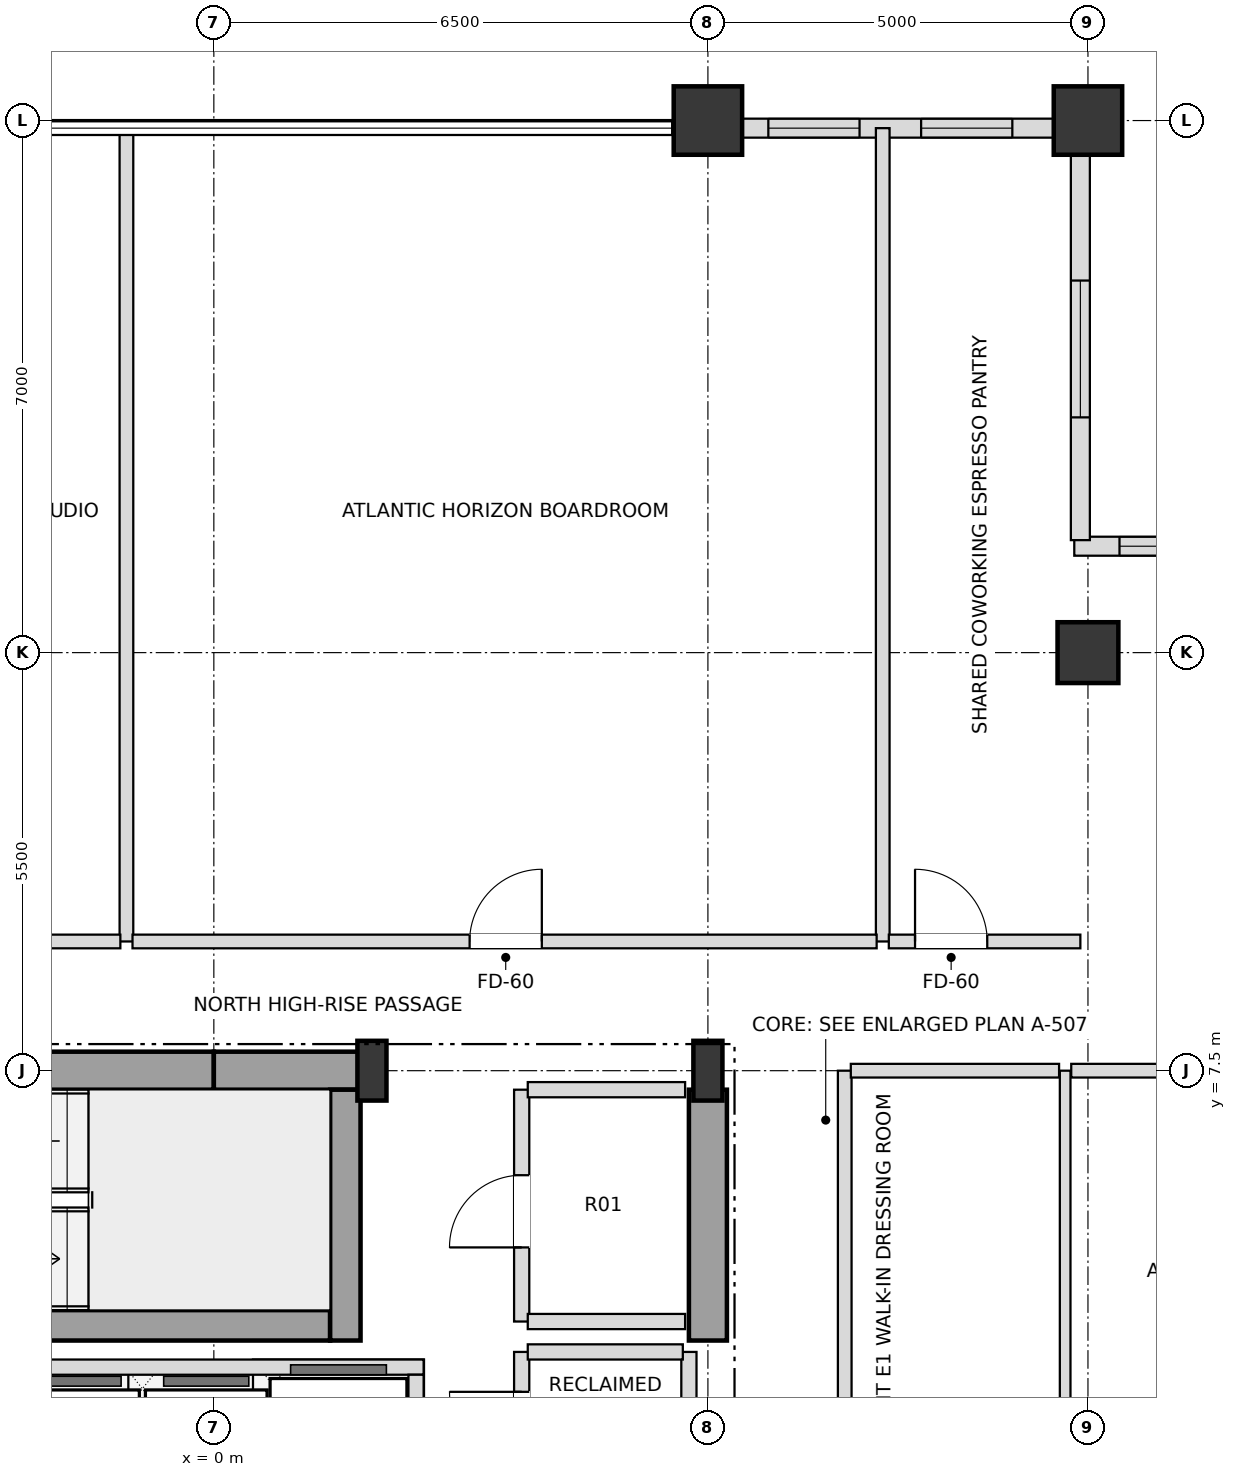
"""IFC4 building model, lengths in metres.
Left out: names, types, materials, properties, quantities, classifications, styles, units other than length and angle.
Written with IfcOpenShell. Run it as: python <this file> out.ifc"""

import sys

from ifc_helpers import new_model, si_unit, direction, frame, frame_2d, origin, origin_2d, place, context, subcontext, project, spatial, rectangle, i_section, extrude, element, fill, save


model = new_model("IFC4")
c1 = context("Model", 3, precision=1e-05, world=origin(), true_north=direction((0.0, 1.0)))
c2 = subcontext(c1, "Body", "Model", "MODEL_VIEW")
j1 = project(units=[si_unit("LENGTHUNIT", "METRE"), si_unit("PLANEANGLEUNIT", "RADIAN")], contexts=[c1])
p1 = place(None, origin())
s1 = spatial("IfcSite", under=j1, at=p1, CompositionType="ELEMENT")
p2 = place(p1, origin())
s2 = spatial("IfcBuilding", under=s1, at=p2, CompositionType="ELEMENT")
p3 = place(p2, frame((0.0, 0.0, 287.1)))
s3 = spatial("IfcBuildingStorey", under=s2, at=p3, CompositionType="ELEMENT", Elevation=287.1)
for number, where, z_axis, x_axis in (
    (1, (2.08, 7.5, 0.0), (0.0, 0.0, 1.0), (1.0, 0.0, 0.0)),
    (2, (6.5, 7.5, 0.0), (0.0, 0.0, 1.0), (1.0, 0.0, 0.0)),
):
    element("IfcColumn", number, at=place(p3, frame(where, z_axis=z_axis, x_axis=x_axis)), inside=s3, PredefinedType="COLUMN", context=c2, shape_type="SweptSolid", body=[
        extrude(i_section(OverallWidth=0.382, OverallDepth=0.786, WebThickness=0.02, FlangeThickness=0.033, at=origin_2d()), origin(), (0.0, 0.0, 1.0), 3.6),
    ])
for number, where, z_axis, x_axis in (
    (3, (11.5, 20.0, 0.0), (0.0, 0.0, 1.0), (1.0, 0.0, 0.0)),
    (4, (6.5, 20.0, 0.0), (0.0, 0.0, 1.0), (1.0, 0.0, 0.0)),
):
    element("IfcColumn", number, at=place(p3, frame(where, z_axis=z_axis, x_axis=x_axis)), inside=s3, PredefinedType="USERDEFINED", context=c2, shape_type="SweptSolid", body=[
        extrude(rectangle(XDim=0.9, YDim=0.9, at=origin_2d()), origin(), (0.0, 0.0, 1.0), 3.6),
    ])
p4 = place(p3, frame((11.5, 13.0, 0.0), z_axis=(0.0, 0.0, 1.0), x_axis=(1.0, 0.0, 0.0)))
e5 = element("IfcColumn", 5, at=p4, inside=s3, PredefinedType="COLUMN", context=c2, shape_type="SweptSolid", body=[
    extrude(rectangle(XDim=0.8, YDim=0.8, at=origin_2d()), origin(), (0.0, 0.0, 1.0), 3.6),
])
p5 = place(p3, frame((11.055, 19.9, 0.0), z_axis=(0.0, 0.0, 1.0), x_axis=(-1.0, 0.0, 0.0)))
e6 = element("IfcWall", 6, at=p5, inside=s3, PredefinedType="SOLIDWALL", context=c2, shape_type="SweptSolid", body=[
    extrude(rectangle(XDim=4.11, YDim=0.25, at=frame_2d((2.055, 0.0))), origin(), (0.0, 0.0, 1.0), 2.748),
])
p6 = place(p5, frame((0.55, 0.0, 0.72)))
e7 = element("IfcOpeningElement", 7, at=p6, cuts=e6, PredefinedType="OPENING", context=c2, shape_type="SweptSolid", body=[
    extrude(rectangle(XDim=1.2, YDim=1.68, at=frame_2d((0.6, 0.84))), frame((0.0, 0.135, 0.0), z_axis=(0.0, -1.0, 0.0), x_axis=(1.0, 0.0, 0.0)), (0.0, 0.0, 1.0), 0.27),
])
p7 = place(p5, frame((2.56, 0.0, 0.72)))
e8 = element("IfcOpeningElement", 8, at=p7, cuts=e6, PredefinedType="OPENING", context=c2, shape_type="SweptSolid", body=[
    extrude(rectangle(XDim=1.2, YDim=1.68, at=frame_2d((0.6, 0.84))), frame((0.0, 0.135, 0.0), z_axis=(0.0, -1.0, 0.0), x_axis=(1.0, 0.0, 0.0)), (0.0, 0.0, 1.0), 0.27),
])
p8 = place(p3, frame((16.98, 14.4, 0.0), z_axis=(0.0, 0.0, 1.0), x_axis=(-1.0, 0.0, 0.0)))
e9 = element("IfcWall", 9, at=p8, inside=s3, PredefinedType="SOLIDWALL", context=c2, shape_type="SweptSolid", body=[
    extrude(rectangle(XDim=5.66, YDim=0.25, at=frame_2d((2.83, 0.0))), origin(), (0.0, 0.0, 1.0), 2.748),
])
p9 = place(p8, frame((0.595, 0.0, 0.72)))
e10 = element("IfcOpeningElement", 10, at=p9, cuts=e9, PredefinedType="OPENING", context=c2, shape_type="SweptSolid", body=[
    extrude(rectangle(XDim=1.8, YDim=1.68, at=frame_2d((0.9, 0.84))), frame((0.0, 0.135, 0.0), z_axis=(0.0, -1.0, 0.0), x_axis=(1.0, 0.0, 0.0)), (0.0, 0.0, 1.0), 0.27),
])
p10 = place(p8, frame((3.265, 0.0, 0.72)))
e11 = element("IfcOpeningElement", 11, at=p10, cuts=e9, PredefinedType="OPENING", context=c2, shape_type="SweptSolid", body=[
    extrude(rectangle(XDim=1.8, YDim=1.68, at=frame_2d((0.9, 0.84))), frame((0.0, 0.135, 0.0), z_axis=(0.0, -1.0, 0.0), x_axis=(1.0, 0.0, 0.0)), (0.0, 0.0, 1.0), 0.27),
])
p11 = place(p3, frame((11.4, 14.48, 0.0), z_axis=(0.0, 0.0, 1.0), x_axis=(0.0, 1.0, 0.0)))
e12 = element("IfcWall", 12, at=p11, inside=s3, PredefinedType="SOLIDWALL", context=c2, shape_type="SweptSolid", body=[
    extrude(rectangle(XDim=5.34, YDim=0.25, at=frame_2d((2.67, 0.0))), origin(), (0.0, 0.0, 1.0), 2.748),
])
p12 = place(p11, frame((1.615, 0.0, 0.72)))
e13 = element("IfcOpeningElement", 13, at=p12, cuts=e12, PredefinedType="OPENING", context=c2, shape_type="SweptSolid", body=[
    extrude(rectangle(XDim=1.8, YDim=1.68, at=frame_2d((0.9, 0.84))), frame((0.0, 0.135, 0.0), z_axis=(0.0, -1.0, 0.0), x_axis=(1.0, 0.0, 0.0)), (0.0, 0.0, 1.0), 0.27),
])
p13 = place(p3, frame((-6.75, 7.5, 0.0), z_axis=(0.0, 0.0, 1.0), x_axis=(1.0, 0.0, 0.0)))
e14 = element("IfcWall", 14, at=p13, inside=s3, PredefinedType="SHEAR", context=c2, shape_type="SweptSolid", body=[
    extrude(rectangle(XDim=6.75, YDim=0.5, at=frame_2d((3.375, 0.0))), origin(), (0.0, 0.0, 1.0), 3.38),
])
p14 = place(p13, frame((1.65, 0.0, 0.0)))
e15 = element("IfcOpeningElement", 15, at=p14, cuts=e14, PredefinedType="OPENING", context=c2, shape_type="SweptSolid", body=[
    extrude(rectangle(XDim=1.05, YDim=2.15, at=frame_2d((0.525, 1.075))), frame((0.0, 0.26, 0.0), z_axis=(0.0, -1.0, 0.0), x_axis=(1.0, 0.0, 0.0)), (0.0, 0.0, 1.0), 0.52),
])
p15 = place(p3, frame((0.0, 7.5, 0.0), z_axis=(0.0, 0.0, 1.0), x_axis=(1.0, 0.0, 0.0)))
e16 = element("IfcWall", 16, at=p15, inside=s3, PredefinedType="SHEAR", context=c2, shape_type="SweptSolid", body=[
    extrude(rectangle(XDim=2.08, YDim=0.5, at=frame_2d((1.04, 0.0))), origin(), (0.0, 0.0, 1.0), 3.38),
])
p16 = place(p3, frame((6.5, 3.95, 0.0), z_axis=(0.0, 0.0, 1.0), x_axis=(0.0, 1.0, 0.0)))
e17 = element("IfcWall", 17, at=p16, inside=s3, PredefinedType="SHEAR", context=c2, shape_type="SweptSolid", body=[
    extrude(rectangle(XDim=3.3, YDim=0.5, at=frame_2d((1.65, 0.0))), origin(), (0.0, 0.0, 1.0), 3.38),
])
p17 = place(p3, frame((-5.55, 4.15, 0.0), z_axis=(0.0, 0.0, 1.0), x_axis=(1.0, 0.0, 0.0)))
e18 = element("IfcWall", 18, at=p17, inside=s3, PredefinedType="SHEAR", context=c2, shape_type="SweptSolid", body=[
    extrude(rectangle(XDim=7.08, YDim=0.4, at=frame_2d((3.54, 0.0))), origin(), (0.0, 0.0, 1.0), 3.38),
])
p18 = place(p3, frame((1.73, 3.95, 0.0), z_axis=(0.0, 0.0, 1.0), x_axis=(0.0, 1.0, 0.0)))
e19 = element("IfcWall", 19, at=p18, inside=s3, PredefinedType="SHEAR", context=c2, shape_type="SweptSolid", body=[
    extrude(rectangle(XDim=3.3, YDim=0.4, at=frame_2d((1.65, 0.0))), origin(), (0.0, 0.0, 1.0), 3.38),
])
p19 = place(p3, frame((-2.82, 3.6, 0.0), z_axis=(0.0, 0.0, 1.0), x_axis=(1.0, 0.0, 0.0)))
e20 = element("IfcWall", 20, at=p19, inside=s3, PredefinedType="SOLIDWALL", context=c2, shape_type="SweptSolid", body=[
    extrude(rectangle(XDim=5.58, YDim=0.2, at=frame_2d((2.79, 0.0))), origin(), (0.0, 0.0, 1.0), 3.38),
])
p20 = place(p3, frame((2.66, 1.0, 0.0), z_axis=(0.0, 0.0, 1.0), x_axis=(0.0, 1.0, 0.0)))
e21 = element("IfcWall", 21, at=p20, inside=s3, PredefinedType="SOLIDWALL", context=c2, shape_type="SweptSolid", body=[
    extrude(rectangle(XDim=2.5, YDim=0.2, at=frame_2d((1.25, 0.0))), origin(), (0.0, 0.0, 1.0), 3.38),
])
p21 = place(p3, frame((-1.15, 9.2, 0.0), z_axis=(0.0, 0.0, 1.0), x_axis=(0.0, 1.0, 0.0)))
e22 = element("IfcWall", 22, at=p21, inside=s3, PredefinedType="PARTITIONING", context=c2, shape_type="SweptSolid", body=[
    extrude(rectangle(XDim=10.7, YDim=0.18, at=frame_2d((5.35, 0.0))), origin(), (0.0, 0.0, 1.0), 3.018),
])
p22 = place(p3, frame((4.05, -1.35, 0.0), z_axis=(0.0, 0.0, 1.0), x_axis=(0.0, 1.0, 0.0)))
e23 = element("IfcWall", 23, at=p22, inside=s3, PredefinedType="SOLIDWALL", context=c2, shape_type="SweptSolid", body=[
    extrude(rectangle(XDim=5.15, YDim=0.2, at=frame_2d((2.575, 0.0))), origin(), (0.0, 0.0, 1.0), 3.38),
])
p23 = place(p22, frame((1.095, 0.0, 0.0)))
e24 = element("IfcOpeningElement", 24, at=p23, cuts=e23, PredefinedType="OPENING", context=c2, shape_type="SweptSolid", body=[
    extrude(rectangle(XDim=0.95, YDim=2.15, at=frame_2d((0.475, 1.075))), frame((0.0, 0.11, 0.0), z_axis=(0.0, -1.0, 0.0), x_axis=(1.0, 0.0, 0.0)), (0.0, 0.0, 1.0), 0.22),
])
p24 = place(p22, frame((3.675, 0.0, 0.0)))
e25 = element("IfcOpeningElement", 25, at=p24, cuts=e23, PredefinedType="OPENING", context=c2, shape_type="SweptSolid", body=[
    extrude(rectangle(XDim=0.95, YDim=2.15, at=frame_2d((0.475, 1.075))), frame((0.0, 0.11, 0.0), z_axis=(0.0, -1.0, 0.0), x_axis=(1.0, 0.0, 0.0)), (0.0, 0.0, 1.0), 0.22),
])
p25 = place(p3, frame((4.05, 4.2, 0.0), z_axis=(0.0, 0.0, 1.0), x_axis=(0.0, 1.0, 0.0)))
e26 = element("IfcWall", 26, at=p25, inside=s3, PredefinedType="SOLIDWALL", context=c2, shape_type="SweptSolid", body=[
    extrude(rectangle(XDim=3.05, YDim=0.2, at=frame_2d((1.525, 0.0))), origin(), (0.0, 0.0, 1.0), 3.38),
])
p26 = place(p25, frame((0.975, 0.0, 0.0)))
e27 = element("IfcOpeningElement", 27, at=p26, cuts=e26, PredefinedType="OPENING", context=c2, shape_type="SweptSolid", body=[
    extrude(rectangle(XDim=0.95, YDim=2.15, at=frame_2d((0.475, 1.075))), frame((0.0, 0.11, 0.0), z_axis=(0.0, -1.0, 0.0), x_axis=(1.0, 0.0, 0.0)), (0.0, 0.0, 1.0), 0.22),
])
p27 = place(p3, frame((6.25, -1.35, 0.0), z_axis=(0.0, 0.0, 1.0), x_axis=(0.0, 1.0, 0.0)))
e28 = element("IfcWall", 28, at=p27, inside=s3, PredefinedType="SOLIDWALL", context=c2, shape_type="SweptSolid", body=[
    extrude(rectangle(XDim=5.15, YDim=0.2, at=frame_2d((2.575, 0.0))), origin(), (0.0, 0.0, 1.0), 3.38),
])
p28 = place(p3, frame((8.3, -7.5, 0.0), z_axis=(0.0, 0.0, 1.0), x_axis=(0.0, 1.0, 0.0)))
e29 = element("IfcWall", 29, at=p28, inside=s3, PredefinedType="PARTITIONING", context=c2, shape_type="SweptSolid", body=[
    extrude(rectangle(XDim=15.0, YDim=0.18, at=frame_2d((7.5, 0.0))), origin(), (0.0, 0.0, 1.0), 3.38),
])
p29 = place(p28, frame((2.355, 0.0, 0.0)))
e30 = element("IfcOpeningElement", 30, at=p29, cuts=e29, PredefinedType="OPENING", context=c2, shape_type="SweptSolid", body=[
    extrude(rectangle(XDim=0.95, YDim=2.15, at=frame_2d((0.475, 1.075))), frame((0.0, 0.1, 0.0), z_axis=(0.0, -1.0, 0.0), x_axis=(1.0, 0.0, 0.0)), (0.0, 0.0, 1.0), 0.2),
])
p30 = place(p3, frame((8.8, 9.2, 0.0), z_axis=(0.0, 0.0, 1.0), x_axis=(0.0, 1.0, 0.0)))
e31 = element("IfcWall", 31, at=p30, inside=s3, PredefinedType="PARTITIONING", context=c2, shape_type="SweptSolid", body=[
    extrude(rectangle(XDim=10.7, YDim=0.18, at=frame_2d((5.35, 0.0))), origin(), (0.0, 0.0, 1.0), 2.826),
])
p31 = place(p3, frame((11.2, -7.5, 0.0), z_axis=(0.0, 0.0, 1.0), x_axis=(0.0, 1.0, 0.0)))
e32 = element("IfcWall", 32, at=p31, inside=s3, PredefinedType="PARTITIONING", context=c2, shape_type="SweptSolid", body=[
    extrude(rectangle(XDim=15.0, YDim=0.14, at=frame_2d((7.5, 0.0))), origin(), (0.0, 0.0, 1.0), 3.38),
])
p32 = place(p31, frame((3.475, 0.0, 0.0)))
e33 = element("IfcOpeningElement", 33, at=p32, cuts=e32, PredefinedType="OPENING", context=c2, shape_type="SweptSolid", body=[
    extrude(rectangle(XDim=0.95, YDim=2.1, at=frame_2d((0.475, 1.05))), frame((0.0, 0.08, 0.0), z_axis=(0.0, -1.0, 0.0), x_axis=(1.0, 0.0, 0.0)), (0.0, 0.0, 1.0), 0.16),
])
p33 = place(p3, frame((4.13, 3.8, 0.0), z_axis=(0.0, 0.0, 1.0), x_axis=(1.0, 0.0, 0.0)))
e34 = element("IfcWall", 34, at=p33, inside=s3, PredefinedType="SOLIDWALL", context=c2, shape_type="SweptSolid", body=[
    extrude(rectangle(XDim=2.04, YDim=0.2, at=frame_2d((1.02, 0.0))), origin(), (0.0, 0.0, 1.0), 3.38),
])
for number, where, z_axis, x_axis in (
    (35, (4.13, 4.2, 0.0), (0.0, 0.0, 1.0), (1.0, 0.0, 0.0)),
    (36, (4.13, 7.25, 0.0), (0.0, 0.0, 1.0), (1.0, 0.0, 0.0)),
):
    element("IfcWall", number, at=place(p3, frame(where, z_axis=z_axis, x_axis=x_axis)), inside=s3, PredefinedType="SOLIDWALL", context=c2, shape_type="SweptSolid", body=[
        extrude(rectangle(XDim=2.07, YDim=0.2, at=frame_2d((1.035, 0.0))), origin(), (0.0, 0.0, 1.0), 3.38),
    ])
p34 = place(p3, frame((8.38, 7.5, 0.0), z_axis=(0.0, 0.0, 1.0), x_axis=(1.0, 0.0, 0.0)))
e37 = element("IfcWall", 37, at=p34, inside=s3, PredefinedType="PARTITIONING", context=c2, shape_type="SweptSolid", body=[
    extrude(rectangle(XDim=2.74, YDim=0.18, at=frame_2d((1.37, 0.0))), origin(), (0.0, 0.0, 1.0), 2.826),
])
p35 = place(p3, frame((11.28, 7.5, 0.0), z_axis=(0.0, 0.0, 1.0), x_axis=(1.0, 0.0, 0.0)))
e38 = element("IfcWall", 38, at=p35, inside=s3, PredefinedType="PARTITIONING", context=c2, shape_type="SweptSolid", body=[
    extrude(rectangle(XDim=5.62, YDim=0.18, at=frame_2d((2.81, 0.0))), origin(), (0.0, 0.0, 1.0), 2.826),
])
p36 = place(p3, frame((-6.42, 9.2, 0.0), z_axis=(0.0, 0.0, 1.0), x_axis=(1.0, 0.0, 0.0)))
e39 = element("IfcWall", 39, at=p36, inside=s3, PredefinedType="PARTITIONING", context=c2, shape_type="SweptSolid", body=[
    extrude(rectangle(XDim=5.19, YDim=0.18, at=frame_2d((2.595, 0.0))), origin(), (0.0, 0.0, 1.0), 3.38),
])
p37 = place(p36, frame((2.135, 0.0, 0.0)))
e40 = element("IfcOpeningElement", 40, at=p37, cuts=e39, PredefinedType="OPENING", context=c2, shape_type="SweptSolid", body=[
    extrude(rectangle(XDim=0.95, YDim=2.15, at=frame_2d((0.475, 1.075))), frame((0.0, 0.1, 0.0), z_axis=(0.0, -1.0, 0.0), x_axis=(1.0, 0.0, 0.0)), (0.0, 0.0, 1.0), 0.2),
])
p38 = place(p3, frame((-1.07, 9.2, 0.0), z_axis=(0.0, 0.0, 1.0), x_axis=(1.0, 0.0, 0.0)))
e41 = element("IfcWall", 41, at=p38, inside=s3, PredefinedType="PARTITIONING", context=c2, shape_type="SweptSolid", body=[
    extrude(rectangle(XDim=9.79, YDim=0.18, at=frame_2d((4.895, 0.0))), origin(), (0.0, 0.0, 1.0), 2.826),
])
p39 = place(p38, frame((4.435, 0.0, 0.0)))
e42 = element("IfcOpeningElement", 42, at=p39, cuts=e41, PredefinedType="OPENING", context=c2, shape_type="SweptSolid", body=[
    extrude(rectangle(XDim=0.95, YDim=2.15, at=frame_2d((0.475, 1.075))), frame((0.0, 0.1, 0.0), z_axis=(0.0, -1.0, 0.0), x_axis=(1.0, 0.0, 0.0)), (0.0, 0.0, 1.0), 0.2),
])
p40 = place(p3, frame((8.88, 9.2, 0.0), z_axis=(0.0, 0.0, 1.0), x_axis=(1.0, 0.0, 0.0)))
e43 = element("IfcWall", 43, at=p40, inside=s3, PredefinedType="PARTITIONING", context=c2, shape_type="SweptSolid", body=[
    extrude(rectangle(XDim=2.52, YDim=0.18, at=frame_2d((1.26, 0.0))), origin(), (0.0, 0.0, 1.0), 3.38),
])
p41 = place(p40, frame((0.345, 0.0, 0.0)))
e44 = element("IfcOpeningElement", 44, at=p41, cuts=e43, PredefinedType="OPENING", context=c2, shape_type="SweptSolid", body=[
    extrude(rectangle(XDim=0.95, YDim=2.15, at=frame_2d((0.475, 1.075))), frame((0.0, 0.1, 0.0), z_axis=(0.0, -1.0, 0.0), x_axis=(1.0, 0.0, 0.0)), (0.0, 0.0, 1.0), 0.2),
])
p42 = place(p6, origin())
e45 = element("IfcWindow", 45, at=p42, inside=s3, PartitioningType="SINGLE_PANEL", PredefinedType="WINDOW", context=c2, shape_type="SweptSolid", body=[
    extrude(rectangle(XDim=1.2, YDim=1.68, at=frame_2d((0.6, 0.84))), frame((0.0, 0.03, 0.0), z_axis=(0.0, -1.0, 0.0), x_axis=(1.0, 0.0, 0.0)), (0.0, 0.0, 1.0), 0.06),
])
fill(e7, e45)
p43 = place(p7, origin())
e46 = element("IfcWindow", 46, at=p43, inside=s3, PartitioningType="SINGLE_PANEL", PredefinedType="WINDOW", context=c2, shape_type="SweptSolid", body=[
    extrude(rectangle(XDim=1.2, YDim=1.68, at=frame_2d((0.6, 0.84))), frame((0.0, 0.03, 0.0), z_axis=(0.0, -1.0, 0.0), x_axis=(1.0, 0.0, 0.0)), (0.0, 0.0, 1.0), 0.06),
])
fill(e8, e46)
p44 = place(p10, origin())
e47 = element("IfcWindow", 47, at=p44, inside=s3, PartitioningType="SINGLE_PANEL", PredefinedType="WINDOW", context=c2, shape_type="SweptSolid", body=[
    extrude(rectangle(XDim=1.8, YDim=1.68, at=frame_2d((0.9, 0.84))), frame((0.0, 0.03, 0.0), z_axis=(0.0, -1.0, 0.0), x_axis=(1.0, 0.0, 0.0)), (0.0, 0.0, 1.0), 0.06),
])
fill(e11, e47)
p45 = place(p12, origin())
e48 = element("IfcWindow", 48, at=p45, inside=s3, PartitioningType="SINGLE_PANEL", PredefinedType="WINDOW", context=c2, shape_type="SweptSolid", body=[
    extrude(rectangle(XDim=1.8, YDim=1.68, at=frame_2d((0.9, 0.84))), frame((0.0, 0.03, 0.0), z_axis=(0.0, -1.0, 0.0), x_axis=(1.0, 0.0, 0.0)), (0.0, 0.0, 1.0), 0.06),
])
fill(e13, e48)
p46 = place(p24, origin())
e49 = element("IfcDoor", 49, at=p46, inside=s3, OperationType="SINGLE_SWING_RIGHT", PredefinedType="DOOR", context=c2, shape_type="SweptSolid", body=[
    extrude(rectangle(XDim=0.95, YDim=2.15, at=frame_2d((0.475, 1.075))), frame((0.0, 0.025, 0.0), z_axis=(0.0, -1.0, 0.0), x_axis=(1.0, 0.0, 0.0)), (0.0, 0.0, 1.0), 0.05),
])
fill(e25, e49)
p47 = place(p26, origin())
e50 = element("IfcDoor", 50, at=p47, inside=s3, OperationType="SINGLE_SWING_LEFT", PredefinedType="DOOR", context=c2, shape_type="SweptSolid", body=[
    extrude(rectangle(XDim=0.95, YDim=2.15, at=frame_2d((0.475, 1.075))), frame((0.0, 0.025, 0.0), z_axis=(0.0, -1.0, 0.0), x_axis=(1.0, 0.0, 0.0)), (0.0, 0.0, 1.0), 0.05),
])
fill(e27, e50)
p48 = place(p39, origin())
e51 = element("IfcDoor", 51, at=p48, inside=s3, OperationType="SINGLE_SWING_RIGHT", PredefinedType="DOOR", context=c2, shape_type="SweptSolid", body=[
    extrude(rectangle(XDim=0.95, YDim=2.15, at=frame_2d((0.475, 1.075))), frame((0.0, 0.025, 0.0), z_axis=(0.0, -1.0, 0.0), x_axis=(1.0, 0.0, 0.0)), (0.0, 0.0, 1.0), 0.05),
])
fill(e42, e51)
p49 = place(p41, origin())
e52 = element("IfcDoor", 52, at=p49, inside=s3, OperationType="SINGLE_SWING_LEFT", PredefinedType="DOOR", context=c2, shape_type="SweptSolid", body=[
    extrude(rectangle(XDim=0.95, YDim=2.15, at=frame_2d((0.475, 1.075))), frame((0.0, 0.025, 0.0), z_axis=(0.0, -1.0, 0.0), x_axis=(1.0, 0.0, 0.0)), (0.0, 0.0, 1.0), 0.05),
])
fill(e44, e52)
save(model, sys.argv[1])
